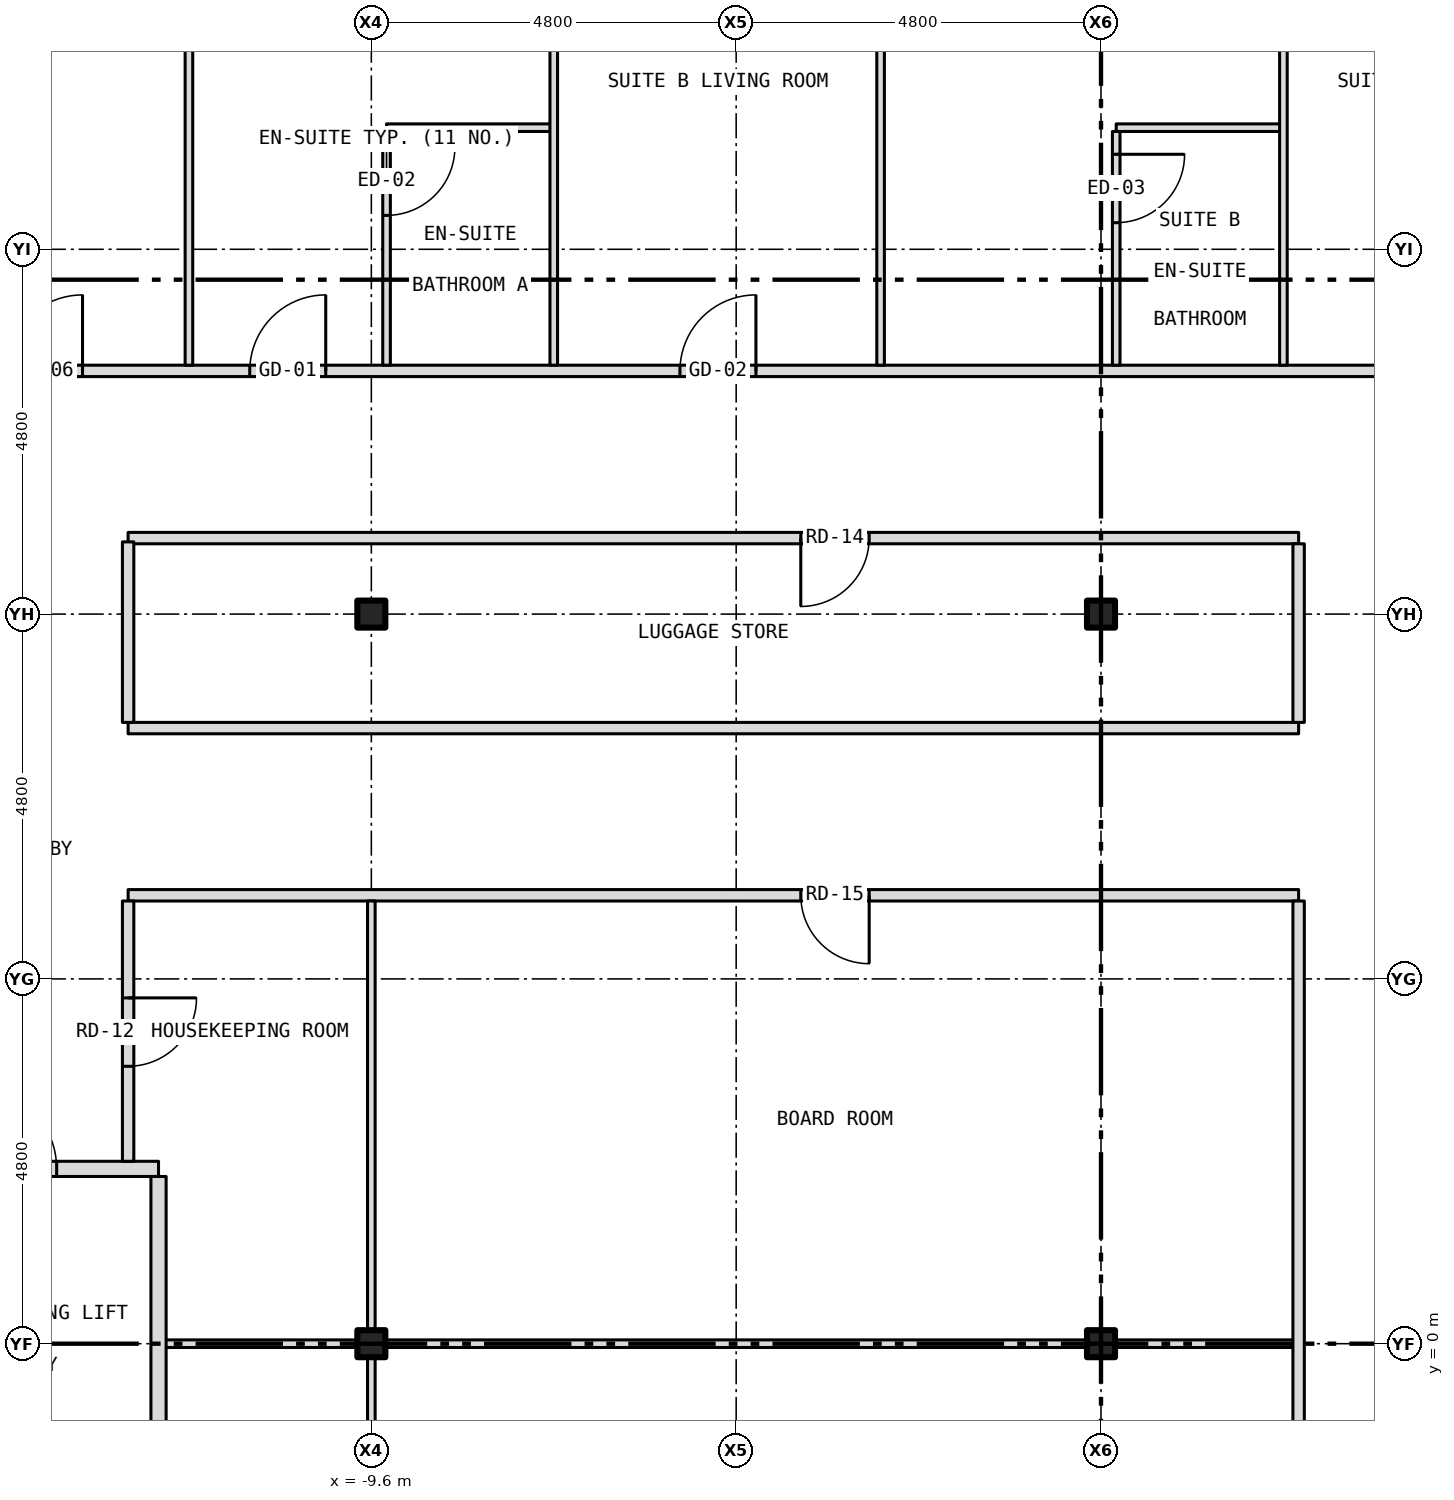
"""IFC4 building model, lengths in metres.
Left out: names, types, materials, properties, quantities, classifications, styles, units other than length and angle.
Written with IfcOpenShell. Run it as: python <this file> out.ifc"""

import sys

from ifc_helpers import new_model, si_unit, direction, frame, frame_2d, origin, origin_2d, place, context, subcontext, project, spatial, rectangle, i_section, extrude, element, fill, save


model = new_model("IFC4")
c1 = context("Model", 3, precision=1e-05, world=origin(), true_north=direction((0.0, 1.0)))
c2 = subcontext(c1, "Body", "Model", "MODEL_VIEW")
j1 = project(units=[si_unit("LENGTHUNIT", "METRE"), si_unit("PLANEANGLEUNIT", "RADIAN")], contexts=[c1])
p1 = place(None, origin())
s1 = spatial("IfcSite", under=j1, at=p1, CompositionType="ELEMENT")
p2 = place(p1, origin())
s2 = spatial("IfcBuilding", under=s1, at=p2, CompositionType="ELEMENT")
p3 = place(p2, frame((0.0, 0.0, 255.0)))
s3 = spatial("IfcBuildingStorey", under=s2, at=p3, CompositionType="ELEMENT", Elevation=255.0)
for number, where, z_axis, x_axis in (
    (1, (-9.6, 0.0, -0.15), (0.0, 0.0, 1.0), (1.0, 0.0, 0.0)),
    (2, (-9.6, 9.6, -0.15), (0.0, 0.0, 1.0), (1.0, 0.0, 0.0)),
    (3, (0.0, 0.0, -0.15), (0.0, 0.0, 1.0), (1.0, 0.0, 0.0)),
    (4, (0.0, 9.6, -0.15), (0.0, 0.0, 1.0), (1.0, 0.0, 0.0)),
):
    element("IfcColumn", number, at=place(p3, frame(where, z_axis=z_axis, x_axis=x_axis)), inside=s3, PredefinedType="COLUMN", context=c2, shape_type="SweptSolid", body=[
        extrude(i_section(OverallWidth=0.368, OverallDepth=0.356, WebThickness=0.011, FlangeThickness=0.018, at=origin_2d()), origin(), (0.0, 0.0, 1.0), 3.5),
    ])
p4 = place(p3, frame((-12.4, 0.0, 0.0), z_axis=(0.0, 0.0, 1.0), x_axis=(1.0, 0.0, 0.0)))
e5 = element("IfcWall", 5, at=p4, inside=s3, PredefinedType="PARTITIONING", context=c2, shape_type="SweptSolid", body=[
    extrude(rectangle(XDim=2.616, YDim=0.1, at=frame_2d((1.308, 0.0))), origin(), (0.0, 0.0, 1.0), 2.728),
])
p5 = place(p3, frame((-9.784, 0.0, 0.0), z_axis=(0.0, 0.0, 1.0), x_axis=(1.0, 0.0, 0.0)))
e6 = element("IfcWall", 6, at=p5, inside=s3, PredefinedType="PARTITIONING", context=c2, shape_type="SweptSolid", body=[
    extrude(rectangle(XDim=0.368, YDim=0.1, at=frame_2d((0.184, 0.0))), origin(), (0.0, 0.0, 1.0), 3.35),
])
p6 = place(p3, frame((-9.416, 0.0, 0.0), z_axis=(0.0, 0.0, 1.0), x_axis=(1.0, 0.0, 0.0)))
e7 = element("IfcWall", 7, at=p6, inside=s3, PredefinedType="PARTITIONING", context=c2, shape_type="SweptSolid", body=[
    extrude(rectangle(XDim=9.232, YDim=0.1, at=frame_2d((4.616, 0.0))), origin(), (0.0, 0.0, 1.0), 2.728),
])
p7 = place(p3, frame((-0.184, 0.0, 0.0), z_axis=(0.0, 0.0, 1.0), x_axis=(1.0, 0.0, 0.0)))
e8 = element("IfcWall", 8, at=p7, inside=s3, PredefinedType="PARTITIONING", context=c2, shape_type="SweptSolid", body=[
    extrude(rectangle(XDim=0.368, YDim=0.1, at=frame_2d((0.184, 0.0))), origin(), (0.0, 0.0, 1.0), 3.35),
])
p8 = place(p3, frame((0.184, 0.0, 0.0), z_axis=(0.0, 0.0, 1.0), x_axis=(1.0, 0.0, 0.0)))
e9 = element("IfcWall", 9, at=p8, inside=s3, PredefinedType="PARTITIONING", context=c2, shape_type="SweptSolid", body=[
    extrude(rectangle(XDim=2.416, YDim=0.1, at=frame_2d((1.208, 0.0))), origin(), (0.0, 0.0, 1.0), 2.728),
])
p9 = place(p3, frame((-15.68, 2.3, 0.0), z_axis=(0.0, 0.0, 1.0), x_axis=(1.0, 0.0, 0.0)))
e10 = element("IfcWall", 10, at=p9, inside=s3, PredefinedType="PARTITIONING", context=c2, shape_type="SweptSolid", body=[
    extrude(rectangle(XDim=3.28, YDim=0.2, at=frame_2d((1.64, 0.0))), origin(), (0.0, 0.0, 1.0), 3.35),
])
p10 = place(p9, frame((0.84, 0.0, 0.0)))
e11 = element("IfcOpeningElement", 11, at=p10, cuts=e10, PredefinedType="OPENING", context=c2, shape_type="SweptSolid", body=[
    extrude(rectangle(XDim=1.1, YDim=2.1, at=frame_2d((0.55, 1.05))), frame((0.0, 0.112, 0.0), z_axis=(0.0, -1.0, 0.0), x_axis=(1.0, 0.0, 0.0)), (0.0, 0.0, 1.0), 0.224),
])
p11 = place(p3, frame((-12.8, 5.9, 0.0), z_axis=(0.0, 0.0, 1.0), x_axis=(1.0, 0.0, 0.0)))
e12 = element("IfcWall", 12, at=p11, inside=s3, PredefinedType="PARTITIONING", context=c2, shape_type="SweptSolid", body=[
    extrude(rectangle(XDim=15.4, YDim=0.15, at=frame_2d((7.7, 0.0))), origin(), (0.0, 0.0, 1.0), 3.35),
])
p12 = place(p11, frame((8.85, 0.0, 0.0)))
e13 = element("IfcOpeningElement", 13, at=p12, cuts=e12, PredefinedType="OPENING", context=c2, shape_type="SweptSolid", body=[
    extrude(rectangle(XDim=0.9, YDim=2.1, at=frame_2d((0.45, 1.05))), frame((0.0, 0.087, 0.0), z_axis=(0.0, -1.0, 0.0), x_axis=(1.0, 0.0, 0.0)), (0.0, 0.0, 1.0), 0.174),
])
p13 = place(p3, frame((-12.8, 8.1, 0.0), z_axis=(0.0, 0.0, 1.0), x_axis=(1.0, 0.0, 0.0)))
e14 = element("IfcWall", 14, at=p13, inside=s3, PredefinedType="PARTITIONING", context=c2, shape_type="SweptSolid", body=[
    extrude(rectangle(XDim=15.4, YDim=0.15, at=frame_2d((7.7, 0.0))), origin(), (0.0, 0.0, 1.0), 3.35),
])
p14 = place(p3, frame((-12.8, 10.6, 0.0), z_axis=(0.0, 0.0, 1.0), x_axis=(1.0, 0.0, 0.0)))
e15 = element("IfcWall", 15, at=p14, inside=s3, PredefinedType="PARTITIONING", context=c2, shape_type="SweptSolid", body=[
    extrude(rectangle(XDim=15.4, YDim=0.15, at=frame_2d((7.7, 0.0))), origin(), (0.0, 0.0, 1.0), 3.35),
])
p15 = place(p14, frame((8.85, 0.0, 0.0)))
e16 = element("IfcOpeningElement", 16, at=p15, cuts=e15, PredefinedType="OPENING", context=c2, shape_type="SweptSolid", body=[
    extrude(rectangle(XDim=0.9, YDim=2.1, at=frame_2d((0.45, 1.05))), frame((0.0, 0.087, 0.0), z_axis=(0.0, -1.0, 0.0), x_axis=(1.0, 0.0, 0.0)), (0.0, 0.0, 1.0), 0.174),
])
p16 = place(p3, frame((-15.8, 12.8, 0.0), z_axis=(0.0, 0.0, 1.0), x_axis=(1.0, 0.0, 0.0)))
e17 = element("IfcWall", 17, at=p16, inside=s3, PredefinedType="PARTITIONING", context=c2, shape_type="SweptSolid", body=[
    extrude(rectangle(XDim=31.6, YDim=0.15, at=frame_2d((15.8, 0.0))), origin(), (0.0, 0.0, 1.0), 3.35),
])
p17 = place(p16, frame((4.6, 0.0, 0.0)))
e18 = element("IfcOpeningElement", 18, at=p17, cuts=e17, PredefinedType="OPENING", context=c2, shape_type="SweptSolid", body=[
    extrude(rectangle(XDim=1.0, YDim=2.1, at=frame_2d((0.5, 1.05))), frame((0.0, 0.087, 0.0), z_axis=(0.0, -1.0, 0.0), x_axis=(1.0, 0.0, 0.0)), (0.0, 0.0, 1.0), 0.174),
])
p18 = place(p16, frame((10.26, 0.0, 0.0)))
e19 = element("IfcOpeningElement", 19, at=p18, cuts=e17, PredefinedType="OPENING", context=c2, shape_type="SweptSolid", body=[
    extrude(rectangle(XDim=1.0, YDim=2.1, at=frame_2d((0.5, 1.05))), frame((0.0, 0.087, 0.0), z_axis=(0.0, -1.0, 0.0), x_axis=(1.0, 0.0, 0.0)), (0.0, 0.0, 1.0), 0.174),
])
p19 = place(p16, frame((19.86, 0.0, 0.0)))
e20 = element("IfcOpeningElement", 20, at=p19, cuts=e17, PredefinedType="OPENING", context=c2, shape_type="SweptSolid", body=[
    extrude(rectangle(XDim=1.0, YDim=2.1, at=frame_2d((0.5, 1.05))), frame((0.0, 0.087, 0.0), z_axis=(0.0, -1.0, 0.0), x_axis=(1.0, 0.0, 0.0)), (0.0, 0.0, 1.0), 0.174),
])
p20 = place(p16, frame((1.4, 0.0, 0.0)))
e21 = element("IfcOpeningElement", 21, at=p20, cuts=e17, PredefinedType="OPENING", context=c2, shape_type="SweptSolid", body=[
    extrude(rectangle(XDim=1.0, YDim=2.1, at=frame_2d((0.5, 1.05))), frame((0.0, 0.087, 0.0), z_axis=(0.0, -1.0, 0.0), x_axis=(1.0, 0.0, 0.0)), (0.0, 0.0, 1.0), 0.174),
])
p21 = place(p16, frame((29.2, 0.0, 0.0)))
e22 = element("IfcOpeningElement", 22, at=p21, cuts=e17, PredefinedType="OPENING", context=c2, shape_type="SweptSolid", body=[
    extrude(rectangle(XDim=1.0, YDim=2.1, at=frame_2d((0.5, 1.05))), frame((0.0, 0.087, 0.0), z_axis=(0.0, -1.0, 0.0), x_axis=(1.0, 0.0, 0.0)), (0.0, 0.0, 1.0), 0.174),
])
for number, where, z_axis, x_axis in (
    (23, (-9.4, 16.0, 0.0), (0.0, 0.0, 1.0), (1.0, 0.0, 0.0)),
    (24, (0.2, 16.0, 0.0), (0.0, 0.0, 1.0), (1.0, 0.0, 0.0)),
):
    element("IfcWall", number, at=place(p3, frame(where, z_axis=z_axis, x_axis=x_axis)), inside=s3, PredefinedType="PARTITIONING", context=c2, shape_type="SweptSolid", body=[
        extrude(rectangle(XDim=2.2, YDim=0.1, at=frame_2d((1.1, 0.0))), origin(), (0.0, 0.0, 1.0), 3.35),
    ])
p22 = place(p3, frame((-12.8, 2.4, 0.0), z_axis=(0.0, 0.0, 1.0), x_axis=(0.0, 1.0, 0.0)))
e25 = element("IfcWall", 25, at=p22, inside=s3, PredefinedType="PARTITIONING", context=c2, shape_type="SweptSolid", body=[
    extrude(rectangle(XDim=3.425, YDim=0.15, at=frame_2d((1.712, 0.0))), origin(), (0.0, 0.0, 1.0), 3.35),
])
p23 = place(p22, frame((1.25, 0.0, 0.0)))
e26 = element("IfcOpeningElement", 26, at=p23, cuts=e25, PredefinedType="OPENING", context=c2, shape_type="SweptSolid", body=[
    extrude(rectangle(XDim=0.9, YDim=2.1, at=frame_2d((0.45, 1.05))), frame((0.0, 0.087, 0.0), z_axis=(0.0, -1.0, 0.0), x_axis=(1.0, 0.0, 0.0)), (0.0, 0.0, 1.0), 0.174),
])
p24 = place(p3, frame((-12.8, 8.175, 0.0), z_axis=(0.0, 0.0, 1.0), x_axis=(0.0, 1.0, 0.0)))
e27 = element("IfcWall", 27, at=p24, inside=s3, PredefinedType="PARTITIONING", context=c2, shape_type="SweptSolid", body=[
    extrude(rectangle(XDim=2.375, YDim=0.15, at=frame_2d((1.188, 0.0))), origin(), (0.0, 0.0, 1.0), 3.35),
])
p25 = place(p3, frame((-12.4, -1.8, 0.0), z_axis=(0.0, 0.0, 1.0), x_axis=(0.0, 1.0, 0.0)))
e28 = element("IfcWall", 28, at=p25, inside=s3, PredefinedType="PARTITIONING", context=c2, shape_type="SweptSolid", body=[
    extrude(rectangle(XDim=4.0, YDim=0.2, at=frame_2d((2.0, 0.0))), origin(), (0.0, 0.0, 1.0), 3.35),
])
p26 = place(p3, frame((-12.0, 12.875, 0.0), z_axis=(0.0, 0.0, 1.0), x_axis=(0.0, 1.0, 0.0)))
e29 = element("IfcWall", 29, at=p26, inside=s3, PredefinedType="PARTITIONING", context=c2, shape_type="SweptSolid", body=[
    extrude(rectangle(XDim=7.855, YDim=0.1, at=frame_2d((3.927, 0.0))), origin(), (0.0, 0.0, 1.0), 3.35),
])
p27 = place(p3, frame((-9.6, -9.416, 0.0), z_axis=(0.0, 0.0, 1.0), x_axis=(0.0, 1.0, 0.0)))
e30 = element("IfcWall", 30, at=p27, inside=s3, PredefinedType="PARTITIONING", context=c2, shape_type="SweptSolid", body=[
    extrude(rectangle(XDim=9.366, YDim=0.1, at=frame_2d((4.683, 0.0))), origin(), (0.0, 0.0, 1.0), 2.728),
])
p28 = place(p3, frame((-9.6, 0.05, 0.0), z_axis=(0.0, 0.0, 1.0), x_axis=(0.0, 1.0, 0.0)))
e31 = element("IfcWall", 31, at=p28, inside=s3, PredefinedType="PARTITIONING", context=c2, shape_type="SweptSolid", body=[
    extrude(rectangle(XDim=5.775, YDim=0.1, at=frame_2d((2.887, 0.0))), origin(), (0.0, 0.0, 1.0), 2.728),
])
p29 = place(p3, frame((-9.4, 12.875, 0.0), z_axis=(0.0, 0.0, 1.0), x_axis=(0.0, 1.0, 0.0)))
e32 = element("IfcWall", 32, at=p29, inside=s3, PredefinedType="PARTITIONING", context=c2, shape_type="SweptSolid", body=[
    extrude(rectangle(XDim=3.075, YDim=0.1, at=frame_2d((1.538, 0.0))), origin(), (0.0, 0.0, 1.0), 2.728),
])
p30 = place(p29, frame((1.971, 0.0, 0.0)))
e33 = element("IfcOpeningElement", 33, at=p30, cuts=e32, PredefinedType="OPENING", context=c2, shape_type="SweptSolid", body=[
    extrude(rectangle(XDim=0.9, YDim=2.1, at=frame_2d((0.45, 1.05))), frame((0.0, 0.062, 0.0), z_axis=(0.0, -1.0, 0.0), x_axis=(1.0, 0.0, 0.0)), (0.0, 0.0, 1.0), 0.124),
])
p31 = place(p3, frame((-7.2, 12.875, 0.0), z_axis=(0.0, 0.0, 1.0), x_axis=(0.0, 1.0, 0.0)))
e34 = element("IfcWall", 34, at=p31, inside=s3, PredefinedType="PARTITIONING", context=c2, shape_type="SweptSolid", body=[
    extrude(rectangle(XDim=7.855, YDim=0.1, at=frame_2d((3.927, 0.0))), origin(), (0.0, 0.0, 1.0), 3.35),
])
p32 = place(p3, frame((-2.9, 12.875, 0.0), z_axis=(0.0, 0.0, 1.0), x_axis=(0.0, 1.0, 0.0)))
e35 = element("IfcWall", 35, at=p32, inside=s3, PredefinedType="PARTITIONING", context=c2, shape_type="SweptSolid", body=[
    extrude(rectangle(XDim=7.855, YDim=0.1, at=frame_2d((3.927, 0.0))), origin(), (0.0, 0.0, 1.0), 3.35),
])
p33 = place(p32, frame((4.795, 0.0, 0.0)))
e36 = element("IfcOpeningElement", 36, at=p33, cuts=e35, PredefinedType="OPENING", context=c2, shape_type="SweptSolid", body=[
    extrude(rectangle(XDim=0.9, YDim=2.1, at=frame_2d((0.45, 1.05))), frame((0.0, 0.062, 0.0), z_axis=(0.0, -1.0, 0.0), x_axis=(1.0, 0.0, 0.0)), (0.0, 0.0, 1.0), 0.124),
])
p34 = place(p3, frame((0.2, 12.875, 0.0), z_axis=(0.0, 0.0, 1.0), x_axis=(0.0, 1.0, 0.0)))
e37 = element("IfcWall", 37, at=p34, inside=s3, PredefinedType="PARTITIONING", context=c2, shape_type="SweptSolid", body=[
    extrude(rectangle(XDim=3.075, YDim=0.1, at=frame_2d((1.538, 0.0))), origin(), (0.0, 0.0, 1.0), 2.728),
])
p35 = place(p34, frame((1.875, 0.0, 0.0)))
e38 = element("IfcOpeningElement", 38, at=p35, cuts=e37, PredefinedType="OPENING", context=c2, shape_type="SweptSolid", body=[
    extrude(rectangle(XDim=0.9, YDim=2.1, at=frame_2d((0.45, 1.05))), frame((0.0, 0.062, 0.0), z_axis=(0.0, -1.0, 0.0), x_axis=(1.0, 0.0, 0.0)), (0.0, 0.0, 1.0), 0.124),
])
p36 = place(p3, frame((2.4, 12.875, 0.0), z_axis=(0.0, 0.0, 1.0), x_axis=(0.0, 1.0, 0.0)))
e39 = element("IfcWall", 39, at=p36, inside=s3, PredefinedType="PARTITIONING", context=c2, shape_type="SweptSolid", body=[
    extrude(rectangle(XDim=7.855, YDim=0.1, at=frame_2d((3.927, 0.0))), origin(), (0.0, 0.0, 1.0), 3.35),
])
p37 = place(p3, frame((2.6, -10.525, 0.0), z_axis=(0.0, 0.0, 1.0), x_axis=(0.0, 1.0, 0.0)))
e40 = element("IfcWall", 40, at=p37, inside=s3, PredefinedType="PARTITIONING", context=c2, shape_type="SweptSolid", body=[
    extrude(rectangle(XDim=16.35, YDim=0.15, at=frame_2d((8.175, 0.0))), origin(), (0.0, 0.0, 1.0), 3.35),
])
p38 = place(p3, frame((2.6, 8.175, 0.0), z_axis=(0.0, 0.0, 1.0), x_axis=(0.0, 1.0, 0.0)))
e41 = element("IfcWall", 41, at=p38, inside=s3, PredefinedType="PARTITIONING", context=c2, shape_type="SweptSolid", body=[
    extrude(rectangle(XDim=2.35, YDim=0.15, at=frame_2d((1.175, 0.0))), origin(), (0.0, 0.0, 1.0), 3.35),
])
p39 = place(p10, origin())
e42 = element("IfcDoor", 42, at=p39, inside=s3, OperationType="SINGLE_SWING_LEFT", PredefinedType="DOOR", context=c2, shape_type="SweptSolid", body=[
    extrude(rectangle(XDim=1.1, YDim=2.1, at=frame_2d((0.55, 1.05))), frame((0.0, 0.025, 0.0), z_axis=(0.0, -1.0, 0.0), x_axis=(1.0, 0.0, 0.0)), (0.0, 0.0, 1.0), 0.05),
])
fill(e11, e42)
p40 = place(p17, origin())
e43 = element("IfcDoor", 43, at=p40, inside=s3, OperationType="SINGLE_SWING_RIGHT", PredefinedType="DOOR", context=c2, shape_type="SweptSolid", body=[
    extrude(rectangle(XDim=1.0, YDim=2.1, at=frame_2d((0.5, 1.05))), frame((0.0, 0.025, 0.0), z_axis=(0.0, -1.0, 0.0), x_axis=(1.0, 0.0, 0.0)), (0.0, 0.0, 1.0), 0.05),
])
fill(e18, e43)
p41 = place(p30, origin())
e44 = element("IfcDoor", 44, at=p41, inside=s3, OperationType="SINGLE_SWING_RIGHT", PredefinedType="DOOR", context=c2, shape_type="SweptSolid", body=[
    extrude(rectangle(XDim=0.9, YDim=2.1, at=frame_2d((0.45, 1.05))), frame((0.0, 0.025, 0.0), z_axis=(0.0, -1.0, 0.0), x_axis=(1.0, 0.0, 0.0)), (0.0, 0.0, 1.0), 0.05),
])
fill(e33, e44)
p42 = place(p18, origin())
e45 = element("IfcDoor", 45, at=p42, inside=s3, OperationType="SINGLE_SWING_RIGHT", PredefinedType="DOOR", context=c2, shape_type="SweptSolid", body=[
    extrude(rectangle(XDim=1.0, YDim=2.1, at=frame_2d((0.5, 1.05))), frame((0.0, 0.025, 0.0), z_axis=(0.0, -1.0, 0.0), x_axis=(1.0, 0.0, 0.0)), (0.0, 0.0, 1.0), 0.05),
])
fill(e19, e45)
p43 = place(p35, origin())
e46 = element("IfcDoor", 46, at=p43, inside=s3, OperationType="SINGLE_SWING_RIGHT", PredefinedType="DOOR", context=c2, shape_type="SweptSolid", body=[
    extrude(rectangle(XDim=0.9, YDim=2.1, at=frame_2d((0.45, 1.05))), frame((0.0, 0.025, 0.0), z_axis=(0.0, -1.0, 0.0), x_axis=(1.0, 0.0, 0.0)), (0.0, 0.0, 1.0), 0.05),
])
fill(e38, e46)
p44 = place(p20, origin())
e47 = element("IfcDoor", 47, at=p44, inside=s3, OperationType="SINGLE_SWING_RIGHT", PredefinedType="DOOR", context=c2, shape_type="SweptSolid", body=[
    extrude(rectangle(XDim=1.0, YDim=2.1, at=frame_2d((0.5, 1.05))), frame((0.0, 0.025, 0.0), z_axis=(0.0, -1.0, 0.0), x_axis=(1.0, 0.0, 0.0)), (0.0, 0.0, 1.0), 0.05),
])
fill(e21, e47)
p45 = place(p23, origin())
e48 = element("IfcDoor", 48, at=p45, inside=s3, OperationType="SINGLE_SWING_RIGHT", PredefinedType="DOOR", context=c2, shape_type="SweptSolid", body=[
    extrude(rectangle(XDim=0.9, YDim=2.1, at=frame_2d((0.45, 1.05))), frame((0.0, 0.025, 0.0), z_axis=(0.0, -1.0, 0.0), x_axis=(1.0, 0.0, 0.0)), (0.0, 0.0, 1.0), 0.05),
])
fill(e26, e48)
p46 = place(p15, origin())
e49 = element("IfcDoor", 49, at=p46, inside=s3, OperationType="SINGLE_SWING_LEFT", PredefinedType="DOOR", context=c2, shape_type="SweptSolid", body=[
    extrude(rectangle(XDim=0.9, YDim=2.1, at=frame_2d((0.45, 1.05))), frame((0.0, 0.025, 0.0), z_axis=(0.0, -1.0, 0.0), x_axis=(1.0, 0.0, 0.0)), (0.0, 0.0, 1.0), 0.05),
])
fill(e16, e49)
p47 = place(p12, origin())
e50 = element("IfcDoor", 50, at=p47, inside=s3, OperationType="SINGLE_SWING_RIGHT", PredefinedType="DOOR", context=c2, shape_type="SweptSolid", body=[
    extrude(rectangle(XDim=0.9, YDim=2.1, at=frame_2d((0.45, 1.05))), frame((0.0, 0.025, 0.0), z_axis=(0.0, -1.0, 0.0), x_axis=(1.0, 0.0, 0.0)), (0.0, 0.0, 1.0), 0.05),
])
fill(e13, e50)
save(model, sys.argv[1])
